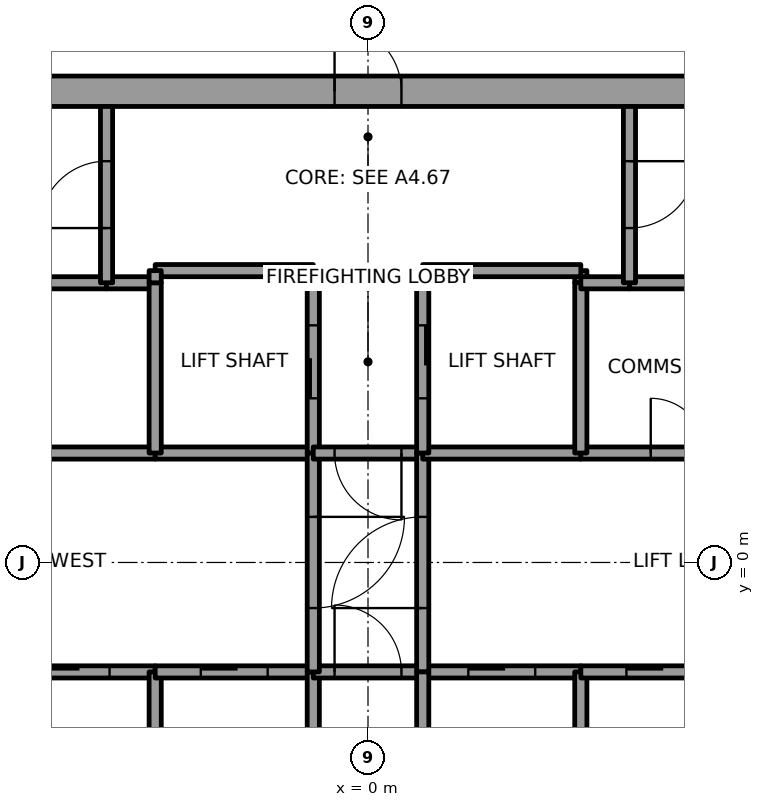
"""IFC4 building model, lengths in metres.
Left out: names, types, materials, properties, quantities, classifications, styles, units other than length and angle.
Written with IfcOpenShell. Run it as: python <this file> out.ifc"""

import sys

from ifc_helpers import new_model, si_unit, direction, frame, frame_2d, origin, place, context, subcontext, project, spatial, rectangle, extrude, element, fill, save


model = new_model("IFC4")
c1 = context("Model", 3, precision=1e-05, world=origin(), true_north=direction((0.0, 1.0)))
c2 = subcontext(c1, "Body", "Model", "MODEL_VIEW")
j1 = project(units=[si_unit("LENGTHUNIT", "METRE"), si_unit("PLANEANGLEUNIT", "RADIAN")], contexts=[c1])
p1 = place(None, origin())
s1 = spatial("IfcSite", under=j1, at=p1, CompositionType="ELEMENT")
p2 = place(p1, origin())
s2 = spatial("IfcBuilding", under=s1, at=p2, CompositionType="ELEMENT")
p3 = place(p2, frame((0.0, 0.0, 287.0)))
s3 = spatial("IfcBuildingStorey", under=s2, at=p3, CompositionType="ELEMENT", Elevation=287.0)
p4 = place(p3, frame((-11.0, 7.75, 0.0), z_axis=(0.0, 0.0, 1.0), x_axis=(1.0, 0.0, 0.0)))
e1 = element("IfcWall", 1, at=p4, inside=s3, PredefinedType="SHEAR", context=c2, shape_type="SweptSolid", body=[
    extrude(rectangle(XDim=22.0, YDim=0.5, at=frame_2d((11.0, 0.0))), origin(), (0.0, 0.0, 1.0), 4.0),
])
p5 = place(p4, frame((10.45, 0.0, 0.0)))
e2 = element("IfcOpeningElement", 2, at=p5, cuts=e1, PredefinedType="OPENING", context=c2, shape_type="SweptSolid", body=[
    extrude(rectangle(XDim=1.1, YDim=2.1, at=frame_2d((0.55, 1.05))), frame((0.0, 0.25, 0.0), z_axis=(0.0, -1.0, 0.0), x_axis=(1.0, 0.0, 0.0)), (0.0, 0.0, 1.0), 0.5),
])
p6 = place(p3, frame((-8.7, 1.8, 0.0), z_axis=(0.0, 0.0, 1.0), x_axis=(1.0, 0.0, 0.0)))
e3 = element("IfcWall", 3, at=p6, inside=s3, PredefinedType="SOLIDWALL", context=c2, shape_type="SweptSolid", body=[
    extrude(rectangle(XDim=5.2, YDim=0.2, at=frame_2d((2.6, 0.0))), origin(), (0.0, 0.0, 1.0), 3.85),
])
p7 = place(p6, frame((2.15, 0.0, 0.0)))
e4 = element("IfcOpeningElement", 4, at=p7, cuts=e3, PredefinedType="OPENING", context=c2, shape_type="SweptSolid", body=[
    extrude(rectangle(XDim=0.9, YDim=2.1, at=frame_2d((0.45, 1.05))), frame((0.0, 0.1, 0.0), z_axis=(0.0, -1.0, 0.0), x_axis=(1.0, 0.0, 0.0)), (0.0, 0.0, 1.0), 0.2),
])
p8 = place(p3, frame((-4.3, 4.6, 0.0), z_axis=(0.0, 0.0, 1.0), x_axis=(-1.0, 0.0, 0.0)))
e5 = element("IfcWall", 5, at=p8, inside=s3, PredefinedType="SOLIDWALL", context=c2, shape_type="SweptSolid", body=[
    extrude(rectangle(XDim=4.4, YDim=0.2, at=frame_2d((2.2, 0.0))), origin(), (0.0, 0.0, 1.0), 3.85),
])
p9 = place(p3, frame((-6.1, -1.8, 0.0), z_axis=(0.0, 0.0, 1.0), x_axis=(1.0, 0.0, 0.0)))
e6 = element("IfcWall", 6, at=p9, inside=s3, PredefinedType="SOLIDWALL", context=c2, shape_type="SweptSolid", body=[
    extrude(rectangle(XDim=2.6, YDim=0.2, at=frame_2d((1.3, 0.0))), origin(), (0.0, 0.0, 1.0), 3.85),
])
p10 = place(p9, frame((0.75, 0.0, 0.0)))
e7 = element("IfcOpeningElement", 7, at=p10, cuts=e6, PredefinedType="OPENING", context=c2, shape_type="SweptSolid", body=[
    extrude(rectangle(XDim=1.1, YDim=2.1, at=frame_2d((0.55, 1.05))), frame((0.0, 0.1, 0.0), z_axis=(0.0, -1.0, 0.0), x_axis=(1.0, 0.0, 0.0)), (0.0, 0.0, 1.0), 0.2),
])
p11 = place(p3, frame((-3.5, 4.6, 0.0), z_axis=(0.0, 0.0, 1.0), x_axis=(-1.0, 0.0, 0.0)))
e8 = element("IfcWall", 8, at=p11, inside=s3, PredefinedType="SOLIDWALL", context=c2, shape_type="SweptSolid", body=[
    extrude(rectangle(XDim=0.8, YDim=0.2, at=frame_2d((0.4, 0.0))), origin(), (0.0, 0.0, 1.0), 3.85),
])
p12 = place(p3, frame((-4.3, 4.6, 0.0), z_axis=(0.0, 0.0, 1.0), x_axis=(0.0, 1.0, 0.0)))
e9 = element("IfcWall", 9, at=p12, inside=s3, PredefinedType="SOLIDWALL", context=c2, shape_type="SweptSolid", body=[
    extrude(rectangle(XDim=2.9, YDim=0.2, at=frame_2d((1.45, 0.0))), origin(), (0.0, 0.0, 1.0), 3.85),
])
p13 = place(p12, frame((0.9, 0.0, 0.0)))
e10 = element("IfcOpeningElement", 10, at=p13, cuts=e9, PredefinedType="OPENING", context=c2, shape_type="SweptSolid", body=[
    extrude(rectangle(XDim=1.1, YDim=2.1, at=frame_2d((0.55, 1.05))), frame((0.0, 0.1, 0.0), z_axis=(0.0, -1.0, 0.0), x_axis=(1.0, 0.0, 0.0)), (0.0, 0.0, 1.0), 0.2),
])
p14 = place(p3, frame((-3.5, -4.6, 0.0), z_axis=(0.0, 0.0, 1.0), x_axis=(0.0, 1.0, 0.0)))
e11 = element("IfcWall", 11, at=p14, inside=s3, PredefinedType="SOLIDWALL", context=c2, shape_type="SweptSolid", body=[
    extrude(rectangle(XDim=2.8, YDim=0.2, at=frame_2d((1.4, 0.0))), origin(), (0.0, 0.0, 1.0), 3.85),
])
p15 = place(p3, frame((-3.5, -1.8, 0.0), z_axis=(0.0, 0.0, 1.0), x_axis=(1.0, 0.0, 0.0)))
e12 = element("IfcWall", 12, at=p15, inside=s3, PredefinedType="SOLIDWALL", context=c2, shape_type="SweptSolid", body=[
    extrude(rectangle(XDim=2.6, YDim=0.2, at=frame_2d((1.3, 0.0))), origin(), (0.0, 0.0, 1.0), 3.85),
])
p16 = place(p15, frame((0.75, 0.0, 0.0)))
e13 = element("IfcOpeningElement", 13, at=p16, cuts=e12, PredefinedType="OPENING", context=c2, shape_type="SweptSolid", body=[
    extrude(rectangle(XDim=1.1, YDim=2.1, at=frame_2d((0.55, 1.05))), frame((0.0, 0.1, 0.0), z_axis=(0.0, -1.0, 0.0), x_axis=(1.0, 0.0, 0.0)), (0.0, 0.0, 1.0), 0.2),
])
p17 = place(p3, frame((-0.9, 1.8, 0.0), z_axis=(0.0, 0.0, 1.0), x_axis=(-1.0, 0.0, 0.0)))
e14 = element("IfcWall", 14, at=p17, inside=s3, PredefinedType="SOLIDWALL", context=c2, shape_type="SweptSolid", body=[
    extrude(rectangle(XDim=2.6, YDim=0.2, at=frame_2d((1.3, 0.0))), origin(), (0.0, 0.0, 1.0), 3.85),
])
p18 = place(p3, frame((-3.5, 1.8, 0.0), z_axis=(0.0, 0.0, 1.0), x_axis=(0.0, 1.0, 0.0)))
e15 = element("IfcWall", 15, at=p18, inside=s3, PredefinedType="SOLIDWALL", context=c2, shape_type="SweptSolid", body=[
    extrude(rectangle(XDim=2.8, YDim=0.2, at=frame_2d((1.4, 0.0))), origin(), (0.0, 0.0, 1.0), 3.85),
])
p19 = place(p3, frame((-0.9, 1.8, 0.0), z_axis=(0.0, 0.0, 1.0), x_axis=(0.0, 1.0, 0.0)))
e16 = element("IfcWall", 16, at=p19, inside=s3, PredefinedType="SOLIDWALL", context=c2, shape_type="SweptSolid", body=[
    extrude(rectangle(XDim=3.0, YDim=0.2, at=frame_2d((1.5, 0.0))), origin(), (0.0, 0.0, 1.0), 3.85),
])
p20 = place(p19, frame((0.9, 0.0, 0.0)))
e17 = element("IfcOpeningElement", 17, at=p20, cuts=e16, PredefinedType="OPENING", context=c2, shape_type="SweptSolid", body=[
    extrude(rectangle(XDim=1.2, YDim=2.1, at=frame_2d((0.6, 1.05))), frame((0.0, 0.1, 0.0), z_axis=(0.0, -1.0, 0.0), x_axis=(1.0, 0.0, 0.0)), (0.0, 0.0, 1.0), 0.2),
])
p21 = place(p3, frame((-0.9, 4.8, 0.0), z_axis=(0.0, 0.0, 1.0), x_axis=(-1.0, 0.0, 0.0)))
e18 = element("IfcWall", 18, at=p21, inside=s3, PredefinedType="SOLIDWALL", context=c2, shape_type="SweptSolid", body=[
    extrude(rectangle(XDim=2.6, YDim=0.2, at=frame_2d((1.3, 0.0))), origin(), (0.0, 0.0, 1.0), 3.85),
])
p22 = place(p3, frame((-3.5, 4.8, 0.0), z_axis=(0.0, 0.0, 1.0), x_axis=(0.0, -1.0, 0.0)))
e19 = element("IfcWall", 19, at=p22, inside=s3, PredefinedType="SOLIDWALL", context=c2, shape_type="SweptSolid", body=[
    extrude(rectangle(XDim=0.2, YDim=0.2, at=frame_2d((0.1, 0.0))), origin(), (0.0, 0.0, 1.0), 3.85),
])
p23 = place(p3, frame((-0.9, -4.6, 0.0), z_axis=(0.0, 0.0, 1.0), x_axis=(0.0, 1.0, 0.0)))
e20 = element("IfcWall", 20, at=p23, inside=s3, PredefinedType="SOLIDWALL", context=c2, shape_type="SweptSolid", body=[
    extrude(rectangle(XDim=2.8, YDim=0.2, at=frame_2d((1.4, 0.0))), origin(), (0.0, 0.0, 1.0), 3.85),
])
p24 = place(p3, frame((-0.9, -1.8, 0.0), z_axis=(0.0, 0.0, 1.0), x_axis=(1.0, 0.0, 0.0)))
e21 = element("IfcWall", 21, at=p24, inside=s3, PredefinedType="SOLIDWALL", context=c2, shape_type="SweptSolid", body=[
    extrude(rectangle(XDim=1.8, YDim=0.2, at=frame_2d((0.9, 0.0))), origin(), (0.0, 0.0, 1.0), 3.85),
])
p25 = place(p24, frame((0.35, 0.0, 0.0)))
e22 = element("IfcOpeningElement", 22, at=p25, cuts=e21, PredefinedType="OPENING", context=c2, shape_type="SweptSolid", body=[
    extrude(rectangle(XDim=1.1, YDim=2.1, at=frame_2d((0.55, 1.05))), frame((0.0, 0.1, 0.0), z_axis=(0.0, -1.0, 0.0), x_axis=(1.0, 0.0, 0.0)), (0.0, 0.0, 1.0), 0.2),
])
p26 = place(p3, frame((-0.9, 1.8, 0.0), z_axis=(0.0, 0.0, 1.0), x_axis=(0.0, -1.0, 0.0)))
e23 = element("IfcWall", 23, at=p26, inside=s3, PredefinedType="SOLIDWALL", context=c2, shape_type="SweptSolid", body=[
    extrude(rectangle(XDim=3.6, YDim=0.2, at=frame_2d((1.8, 0.0))), origin(), (0.0, 0.0, 1.0), 3.85),
])
p27 = place(p26, frame((1.05, 0.0, 0.0)))
e24 = element("IfcOpeningElement", 24, at=p27, cuts=e23, PredefinedType="OPENING", context=c2, shape_type="SweptSolid", body=[
    extrude(rectangle(XDim=1.5, YDim=2.1, at=frame_2d((0.75, 1.05))), frame((0.0, 0.1, 0.0), z_axis=(0.0, -1.0, 0.0), x_axis=(1.0, 0.0, 0.0)), (0.0, 0.0, 1.0), 0.2),
])
p28 = place(p3, frame((0.9, 1.8, 0.0), z_axis=(0.0, 0.0, 1.0), x_axis=(-1.0, 0.0, 0.0)))
e25 = element("IfcWall", 25, at=p28, inside=s3, PredefinedType="SOLIDWALL", context=c2, shape_type="SweptSolid", body=[
    extrude(rectangle(XDim=1.8, YDim=0.2, at=frame_2d((0.9, 0.0))), origin(), (0.0, 0.0, 1.0), 3.85),
])
p29 = place(p28, frame((0.35, 0.0, 0.0)))
e26 = element("IfcOpeningElement", 26, at=p29, cuts=e25, PredefinedType="OPENING", context=c2, shape_type="SweptSolid", body=[
    extrude(rectangle(XDim=1.1, YDim=2.1, at=frame_2d((0.55, 1.05))), frame((0.0, 0.1, 0.0), z_axis=(0.0, -1.0, 0.0), x_axis=(1.0, 0.0, 0.0)), (0.0, 0.0, 1.0), 0.2),
])
p30 = place(p3, frame((0.9, -1.8, 0.0), z_axis=(0.0, 0.0, 1.0), x_axis=(1.0, 0.0, 0.0)))
e27 = element("IfcWall", 27, at=p30, inside=s3, PredefinedType="SOLIDWALL", context=c2, shape_type="SweptSolid", body=[
    extrude(rectangle(XDim=2.6, YDim=0.2, at=frame_2d((1.3, 0.0))), origin(), (0.0, 0.0, 1.0), 3.85),
])
p31 = place(p30, frame((0.75, 0.0, 0.0)))
e28 = element("IfcOpeningElement", 28, at=p31, cuts=e27, PredefinedType="OPENING", context=c2, shape_type="SweptSolid", body=[
    extrude(rectangle(XDim=1.1, YDim=2.1, at=frame_2d((0.55, 1.05))), frame((0.0, 0.1, 0.0), z_axis=(0.0, -1.0, 0.0), x_axis=(1.0, 0.0, 0.0)), (0.0, 0.0, 1.0), 0.2),
])
p32 = place(p3, frame((0.9, -1.8, 0.0), z_axis=(0.0, 0.0, 1.0), x_axis=(0.0, 1.0, 0.0)))
e29 = element("IfcWall", 29, at=p32, inside=s3, PredefinedType="SOLIDWALL", context=c2, shape_type="SweptSolid", body=[
    extrude(rectangle(XDim=3.6, YDim=0.2, at=frame_2d((1.8, 0.0))), origin(), (0.0, 0.0, 1.0), 3.85),
])
p33 = place(p32, frame((1.05, 0.0, 0.0)))
e30 = element("IfcOpeningElement", 30, at=p33, cuts=e29, PredefinedType="OPENING", context=c2, shape_type="SweptSolid", body=[
    extrude(rectangle(XDim=1.5, YDim=2.1, at=frame_2d((0.75, 1.05))), frame((0.0, 0.1, 0.0), z_axis=(0.0, -1.0, 0.0), x_axis=(1.0, 0.0, 0.0)), (0.0, 0.0, 1.0), 0.2),
])
p34 = place(p3, frame((0.9, -1.8, 0.0), z_axis=(0.0, 0.0, 1.0), x_axis=(0.0, -1.0, 0.0)))
e31 = element("IfcWall", 31, at=p34, inside=s3, PredefinedType="SOLIDWALL", context=c2, shape_type="SweptSolid", body=[
    extrude(rectangle(XDim=2.8, YDim=0.2, at=frame_2d((1.4, 0.0))), origin(), (0.0, 0.0, 1.0), 3.85),
])
p35 = place(p3, frame((3.5, 1.8, 0.0), z_axis=(0.0, 0.0, 1.0), x_axis=(-1.0, 0.0, 0.0)))
e32 = element("IfcWall", 32, at=p35, inside=s3, PredefinedType="SOLIDWALL", context=c2, shape_type="SweptSolid", body=[
    extrude(rectangle(XDim=2.6, YDim=0.2, at=frame_2d((1.3, 0.0))), origin(), (0.0, 0.0, 1.0), 3.85),
])
p36 = place(p3, frame((3.5, 4.6, 0.0), z_axis=(0.0, 0.0, 1.0), x_axis=(0.0, 1.0, 0.0)))
e33 = element("IfcWall", 33, at=p36, inside=s3, PredefinedType="SOLIDWALL", context=c2, shape_type="SweptSolid", body=[
    extrude(rectangle(XDim=0.2, YDim=0.2, at=frame_2d((0.1, 0.0))), origin(), (0.0, 0.0, 1.0), 3.85),
])
p37 = place(p3, frame((3.5, 4.8, 0.0), z_axis=(0.0, 0.0, 1.0), x_axis=(-1.0, 0.0, 0.0)))
e34 = element("IfcWall", 34, at=p37, inside=s3, PredefinedType="SOLIDWALL", context=c2, shape_type="SweptSolid", body=[
    extrude(rectangle(XDim=2.6, YDim=0.2, at=frame_2d((1.3, 0.0))), origin(), (0.0, 0.0, 1.0), 3.85),
])
p38 = place(p3, frame((0.9, 4.8, 0.0), z_axis=(0.0, 0.0, 1.0), x_axis=(0.0, -1.0, 0.0)))
e35 = element("IfcWall", 35, at=p38, inside=s3, PredefinedType="SOLIDWALL", context=c2, shape_type="SweptSolid", body=[
    extrude(rectangle(XDim=3.0, YDim=0.2, at=frame_2d((1.5, 0.0))), origin(), (0.0, 0.0, 1.0), 3.85),
])
p39 = place(p38, frame((0.9, 0.0, 0.0)))
e36 = element("IfcOpeningElement", 36, at=p39, cuts=e35, PredefinedType="OPENING", context=c2, shape_type="SweptSolid", body=[
    extrude(rectangle(XDim=1.2, YDim=2.1, at=frame_2d((0.6, 1.05))), frame((0.0, 0.1, 0.0), z_axis=(0.0, -1.0, 0.0), x_axis=(1.0, 0.0, 0.0)), (0.0, 0.0, 1.0), 0.2),
])
p40 = place(p3, frame((3.5, -4.6, 0.0), z_axis=(0.0, 0.0, 1.0), x_axis=(0.0, 1.0, 0.0)))
e37 = element("IfcWall", 37, at=p40, inside=s3, PredefinedType="SOLIDWALL", context=c2, shape_type="SweptSolid", body=[
    extrude(rectangle(XDim=2.8, YDim=0.2, at=frame_2d((1.4, 0.0))), origin(), (0.0, 0.0, 1.0), 3.85),
])
p41 = place(p3, frame((3.5, -1.8, 0.0), z_axis=(0.0, 0.0, 1.0), x_axis=(1.0, 0.0, 0.0)))
e38 = element("IfcWall", 38, at=p41, inside=s3, PredefinedType="SOLIDWALL", context=c2, shape_type="SweptSolid", body=[
    extrude(rectangle(XDim=2.6, YDim=0.2, at=frame_2d((1.3, 0.0))), origin(), (0.0, 0.0, 1.0), 3.85),
])
p42 = place(p41, frame((0.75, 0.0, 0.0)))
e39 = element("IfcOpeningElement", 39, at=p42, cuts=e38, PredefinedType="OPENING", context=c2, shape_type="SweptSolid", body=[
    extrude(rectangle(XDim=1.1, YDim=2.1, at=frame_2d((0.55, 1.05))), frame((0.0, 0.1, 0.0), z_axis=(0.0, -1.0, 0.0), x_axis=(1.0, 0.0, 0.0)), (0.0, 0.0, 1.0), 0.2),
])
p43 = place(p3, frame((3.5, 1.8, 0.0), z_axis=(0.0, 0.0, 1.0), x_axis=(1.0, 0.0, 0.0)))
e40 = element("IfcWall", 40, at=p43, inside=s3, PredefinedType="SOLIDWALL", context=c2, shape_type="SweptSolid", body=[
    extrude(rectangle(XDim=3.2, YDim=0.2, at=frame_2d((1.6, 0.0))), origin(), (0.0, 0.0, 1.0), 3.85),
])
p44 = place(p43, frame((1.15, 0.0, 0.0)))
e41 = element("IfcOpeningElement", 41, at=p44, cuts=e40, PredefinedType="OPENING", context=c2, shape_type="SweptSolid", body=[
    extrude(rectangle(XDim=0.9, YDim=2.1, at=frame_2d((0.45, 1.05))), frame((0.0, 0.1, 0.0), z_axis=(0.0, -1.0, 0.0), x_axis=(1.0, 0.0, 0.0)), (0.0, 0.0, 1.0), 0.2),
])
p45 = place(p3, frame((3.5, 4.6, 0.0), z_axis=(0.0, 0.0, 1.0), x_axis=(0.0, -1.0, 0.0)))
e42 = element("IfcWall", 42, at=p45, inside=s3, PredefinedType="SOLIDWALL", context=c2, shape_type="SweptSolid", body=[
    extrude(rectangle(XDim=2.8, YDim=0.2, at=frame_2d((1.4, 0.0))), origin(), (0.0, 0.0, 1.0), 3.85),
])
p46 = place(p3, frame((4.3, 4.6, 0.0), z_axis=(0.0, 0.0, 1.0), x_axis=(-1.0, 0.0, 0.0)))
e43 = element("IfcWall", 43, at=p46, inside=s3, PredefinedType="SOLIDWALL", context=c2, shape_type="SweptSolid", body=[
    extrude(rectangle(XDim=0.8, YDim=0.2, at=frame_2d((0.4, 0.0))), origin(), (0.0, 0.0, 1.0), 3.85),
])
p47 = place(p3, frame((6.7, 4.6, 0.0), z_axis=(0.0, 0.0, 1.0), x_axis=(-1.0, 0.0, 0.0)))
e44 = element("IfcWall", 44, at=p47, inside=s3, PredefinedType="SOLIDWALL", context=c2, shape_type="SweptSolid", body=[
    extrude(rectangle(XDim=2.4, YDim=0.2, at=frame_2d((1.2, 0.0))), origin(), (0.0, 0.0, 1.0), 3.85),
])
p48 = place(p3, frame((4.3, 7.5, 0.0), z_axis=(0.0, 0.0, 1.0), x_axis=(0.0, -1.0, 0.0)))
e45 = element("IfcWall", 45, at=p48, inside=s3, PredefinedType="SOLIDWALL", context=c2, shape_type="SweptSolid", body=[
    extrude(rectangle(XDim=2.9, YDim=0.2, at=frame_2d((1.45, 0.0))), origin(), (0.0, 0.0, 1.0), 3.85),
])
p49 = place(p48, frame((0.9, 0.0, 0.0)))
e46 = element("IfcOpeningElement", 46, at=p49, cuts=e45, PredefinedType="OPENING", context=c2, shape_type="SweptSolid", body=[
    extrude(rectangle(XDim=1.1, YDim=2.1, at=frame_2d((0.55, 1.05))), frame((0.0, 0.1, 0.0), z_axis=(0.0, -1.0, 0.0), x_axis=(1.0, 0.0, 0.0)), (0.0, 0.0, 1.0), 0.2),
])
p50 = place(p10, origin())
e47 = element("IfcDoor", 47, at=p50, inside=s3, OperationType="SLIDING_TO_LEFT", PredefinedType="DOOR", context=c2, shape_type="SweptSolid", body=[
    extrude(rectangle(XDim=1.1, YDim=2.1, at=frame_2d((0.55, 1.05))), frame((0.0, 0.025, 0.0), z_axis=(0.0, -1.0, 0.0), x_axis=(1.0, 0.0, 0.0)), (0.0, 0.0, 1.0), 0.05),
])
fill(e7, e47)
p51 = place(p16, origin())
e48 = element("IfcDoor", 48, at=p51, inside=s3, OperationType="SLIDING_TO_LEFT", PredefinedType="DOOR", context=c2, shape_type="SweptSolid", body=[
    extrude(rectangle(XDim=1.1, YDim=2.1, at=frame_2d((0.55, 1.05))), frame((0.0, 0.025, 0.0), z_axis=(0.0, -1.0, 0.0), x_axis=(1.0, 0.0, 0.0)), (0.0, 0.0, 1.0), 0.05),
])
fill(e13, e48)
p52 = place(p31, origin())
e49 = element("IfcDoor", 49, at=p52, inside=s3, OperationType="SLIDING_TO_RIGHT", PredefinedType="DOOR", context=c2, shape_type="SweptSolid", body=[
    extrude(rectangle(XDim=1.1, YDim=2.1, at=frame_2d((0.55, 1.05))), frame((0.0, 0.025, 0.0), z_axis=(0.0, -1.0, 0.0), x_axis=(1.0, 0.0, 0.0)), (0.0, 0.0, 1.0), 0.05),
])
fill(e28, e49)
p53 = place(p42, origin())
e50 = element("IfcDoor", 50, at=p53, inside=s3, OperationType="SLIDING_TO_RIGHT", PredefinedType="DOOR", context=c2, shape_type="SweptSolid", body=[
    extrude(rectangle(XDim=1.1, YDim=2.1, at=frame_2d((0.55, 1.05))), frame((0.0, 0.025, 0.0), z_axis=(0.0, -1.0, 0.0), x_axis=(1.0, 0.0, 0.0)), (0.0, 0.0, 1.0), 0.05),
])
fill(e39, e50)
p54 = place(p20, origin())
e51 = element("IfcDoor", 51, at=p54, inside=s3, OperationType="SLIDING_TO_RIGHT", PredefinedType="DOOR", context=c2, shape_type="SweptSolid", body=[
    extrude(rectangle(XDim=1.2, YDim=2.1, at=frame_2d((0.6, 1.05))), frame((0.0, 0.025, 0.0), z_axis=(0.0, -1.0, 0.0), x_axis=(1.0, 0.0, 0.0)), (0.0, 0.0, 1.0), 0.05),
])
fill(e17, e51)
p55 = place(p39, origin())
e52 = element("IfcDoor", 52, at=p55, inside=s3, OperationType="SLIDING_TO_LEFT", PredefinedType="DOOR", context=c2, shape_type="SweptSolid", body=[
    extrude(rectangle(XDim=1.2, YDim=2.1, at=frame_2d((0.6, 1.05))), frame((0.0, 0.025, 0.0), z_axis=(0.0, -1.0, 0.0), x_axis=(1.0, 0.0, 0.0)), (0.0, 0.0, 1.0), 0.05),
])
fill(e36, e52)
p56 = place(p27, origin())
e53 = element("IfcDoor", 53, at=p56, inside=s3, OperationType="DOUBLE_DOOR_SINGLE_SWING", PredefinedType="DOOR", context=c2, shape_type="SweptSolid", body=[
    extrude(rectangle(XDim=1.5, YDim=2.1, at=frame_2d((0.75, 1.05))), frame((0.0, 0.025, 0.0), z_axis=(0.0, -1.0, 0.0), x_axis=(1.0, 0.0, 0.0)), (0.0, 0.0, 1.0), 0.05),
])
fill(e24, e53)
p57 = place(p33, origin())
e54 = element("IfcDoor", 54, at=p57, inside=s3, OperationType="DOUBLE_DOOR_SINGLE_SWING", PredefinedType="DOOR", context=c2, shape_type="SweptSolid", body=[
    extrude(rectangle(XDim=1.5, YDim=2.1, at=frame_2d((0.75, 1.05))), frame((0.0, 0.025, 0.0), z_axis=(0.0, -1.0, 0.0), x_axis=(1.0, 0.0, 0.0)), (0.0, 0.0, 1.0), 0.05),
])
fill(e30, e54)
p58 = place(p29, origin())
e55 = element("IfcDoor", 55, at=p58, inside=s3, OperationType="SINGLE_SWING_LEFT", PredefinedType="DOOR", context=c2, shape_type="SweptSolid", body=[
    extrude(rectangle(XDim=1.1, YDim=2.1, at=frame_2d((0.55, 1.05))), frame((0.0, 0.025, 0.0), z_axis=(0.0, -1.0, 0.0), x_axis=(1.0, 0.0, 0.0)), (0.0, 0.0, 1.0), 0.05),
])
fill(e26, e55)
p59 = place(p25, origin())
e56 = element("IfcDoor", 56, at=p59, inside=s3, OperationType="SINGLE_SWING_RIGHT", PredefinedType="DOOR", context=c2, shape_type="SweptSolid", body=[
    extrude(rectangle(XDim=1.1, YDim=2.1, at=frame_2d((0.55, 1.05))), frame((0.0, 0.025, 0.0), z_axis=(0.0, -1.0, 0.0), x_axis=(1.0, 0.0, 0.0)), (0.0, 0.0, 1.0), 0.05),
])
fill(e22, e56)
p60 = place(p13, origin())
e57 = element("IfcDoor", 57, at=p60, inside=s3, OperationType="SINGLE_SWING_LEFT", PredefinedType="DOOR", context=c2, shape_type="SweptSolid", body=[
    extrude(rectangle(XDim=1.1, YDim=2.1, at=frame_2d((0.55, 1.05))), frame((0.0, 0.025, 0.0), z_axis=(0.0, -1.0, 0.0), x_axis=(1.0, 0.0, 0.0)), (0.0, 0.0, 1.0), 0.05),
])
fill(e10, e57)
p61 = place(p49, origin())
e58 = element("IfcDoor", 58, at=p61, inside=s3, OperationType="SINGLE_SWING_RIGHT", PredefinedType="DOOR", context=c2, shape_type="SweptSolid", body=[
    extrude(rectangle(XDim=1.1, YDim=2.1, at=frame_2d((0.55, 1.05))), frame((0.0, 0.025, 0.0), z_axis=(0.0, -1.0, 0.0), x_axis=(1.0, 0.0, 0.0)), (0.0, 0.0, 1.0), 0.05),
])
fill(e46, e58)
p62 = place(p44, origin())
e59 = element("IfcDoor", 59, at=p62, inside=s3, OperationType="SINGLE_SWING_LEFT", PredefinedType="DOOR", context=c2, shape_type="SweptSolid", body=[
    extrude(rectangle(XDim=0.9, YDim=2.1, at=frame_2d((0.45, 1.05))), frame((0.0, 0.025, 0.0), z_axis=(0.0, -1.0, 0.0), x_axis=(1.0, 0.0, 0.0)), (0.0, 0.0, 1.0), 0.05),
])
fill(e41, e59)
p63 = place(p5, origin())
e60 = element("IfcDoor", 60, at=p63, inside=s3, OperationType="SINGLE_SWING_RIGHT", PredefinedType="DOOR", context=c2, shape_type="SweptSolid", body=[
    extrude(rectangle(XDim=1.1, YDim=2.1, at=frame_2d((0.55, 1.05))), frame((0.0, 0.025, 0.0), z_axis=(0.0, -1.0, 0.0), x_axis=(1.0, 0.0, 0.0)), (0.0, 0.0, 1.0), 0.05),
])
fill(e2, e60)
save(model, sys.argv[1])
